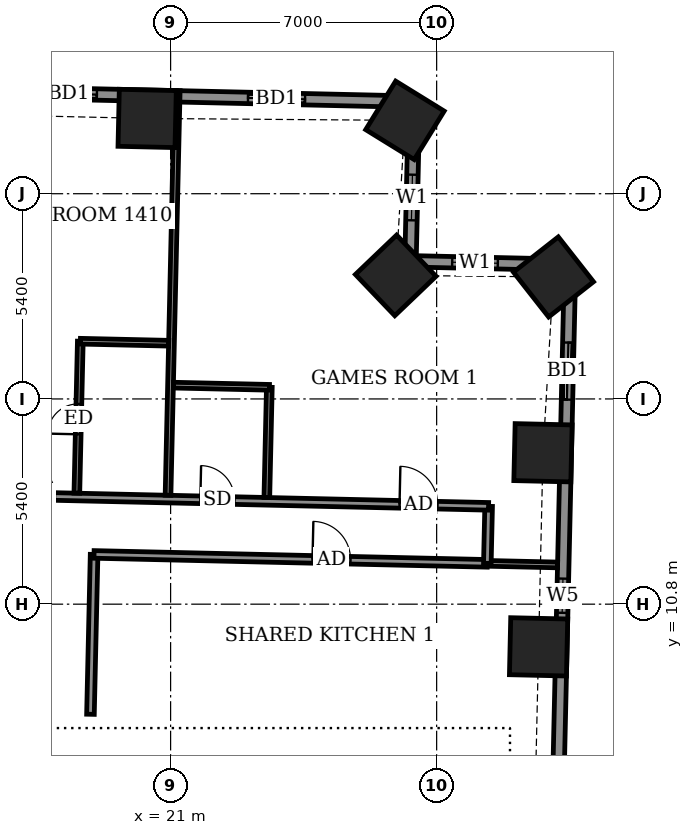
"""IFC4 building model, lengths in metres.
Left out: names, types, materials, properties, quantities, classifications, styles, units other than length and angle.
Written with IfcOpenShell. Run it as: python <this file> out.ifc"""

import sys

from ifc_helpers import new_model, si_unit, direction, frame, frame_2d, origin, origin_2d, place, context, subcontext, project, spatial, rectangle, extrude, element, fill, save


model = new_model("IFC4")
c1 = context("Model", 3, precision=1e-05, world=origin(), true_north=direction((0.0, 1.0)))
c2 = subcontext(c1, "Body", "Model", "MODEL_VIEW")
j1 = project(units=[si_unit("LENGTHUNIT", "METRE"), si_unit("PLANEANGLEUNIT", "RADIAN")], contexts=[c1])
p1 = place(None, origin())
s1 = spatial("IfcSite", under=j1, at=p1, CompositionType="ELEMENT")
p2 = place(p1, origin())
s2 = spatial("IfcBuilding", under=s1, at=p2, CompositionType="ELEMENT")
p3 = place(p2, frame((0.0, 0.0, 60.3)))
s3 = spatial("IfcBuildingStorey", under=s2, at=p3, CompositionType="ELEMENT", Elevation=60.3)
for number, where, z_axis, x_axis in (
    (1, (30.682, 9.677, -0.55), (0.0, 0.0, 1.0), (0.023, 1.0, 0.0)),
    (2, (30.798, 14.784, -0.55), (0.0, 0.0, 1.0), (0.023, 1.0, 0.0)),
    (3, (31.074, 19.41, -0.55), (0.0, 0.0, 1.0), (-0.617, 0.787, 0.0)),
    (4, (26.923, 19.451, -0.55), (0.0, 0.0, 1.0), (-0.691, 0.723, 0.0)),
    (5, (27.166, 23.53, -0.55), (0.0, 0.0, 1.0), (-0.851, 0.525, 0.0)),
    (6, (20.383, 23.58, -0.55), (0.0, 0.0, 1.0), (-1.0, 0.023, 0.0)),
):
    element("IfcColumn", number, at=place(p3, frame(where, z_axis=z_axis, x_axis=x_axis)), inside=s3, PredefinedType="COLUMN", context=c2, shape_type="SweptSolid", body=[
        extrude(rectangle(XDim=1.5, YDim=1.5, at=origin_2d()), origin(), (0.0, 0.0, 1.0), 3.6),
    ])
p4 = place(p3, frame((31.165, 4.502, 0.0), z_axis=(0.0, 0.0, 1.0), x_axis=(0.022716307128, 0.999741951401, 0.0)))
e7 = element("IfcWall", 7, at=p4, inside=s3, PredefinedType="SOLIDWALL", context=c2, shape_type="SweptSolid", body=[
    extrude(rectangle(XDim=15.229, YDim=0.3, at=frame_2d((7.615, 0.0))), origin(), (0.0, 0.0, 1.0), 3.05),
])
p5 = place(p4, frame((6.072, 0.0, 0.9)))
e8 = element("IfcOpeningElement", 8, at=p5, cuts=e7, PredefinedType="OPENING", context=c2, shape_type="SweptSolid", body=[
    extrude(rectangle(XDim=0.9, YDim=1.5, at=frame_2d((0.45, 0.75))), frame((0.0, 0.16, 0.0), z_axis=(0.0, -1.0, 0.0), x_axis=(1.0, 0.0, 0.0)), (0.0, 0.0, 1.0), 0.32),
])
p6 = place(p4, frame((11.684, 0.0, 0.0)))
e9 = element("IfcOpeningElement", 9, at=p6, cuts=e7, PredefinedType="OPENING", context=c2, shape_type="SweptSolid", body=[
    extrude(rectangle(XDim=1.5, YDim=2.4, at=frame_2d((0.75, 1.2))), frame((0.0, 0.16, 0.0), z_axis=(0.0, -1.0, 0.0), x_axis=(1.0, 0.0, 0.0)), (0.0, 0.0, 1.0), 0.32),
])
p7 = place(p3, frame((31.511, 19.727, 0.0), z_axis=(0.0, 0.0, 1.0), x_axis=(-0.999744320311, 0.022611811187, 0.0)))
e10 = element("IfcWall", 10, at=p7, inside=s3, PredefinedType="SOLIDWALL", context=c2, shape_type="SweptSolid", body=[
    extrude(rectangle(XDim=4.2, YDim=0.3, at=frame_2d((2.1, 0.0))), origin(), (0.0, 0.0, 1.0), 3.05),
])
p8 = place(p7, frame((1.902, 0.0, 0.9)))
e11 = element("IfcOpeningElement", 11, at=p8, cuts=e10, PredefinedType="OPENING", context=c2, shape_type="SweptSolid", body=[
    extrude(rectangle(XDim=1.2, YDim=1.5, at=frame_2d((0.6, 0.75))), frame((0.0, 0.16, 0.0), z_axis=(0.0, -1.0, 0.0), x_axis=(1.0, 0.0, 0.0)), (0.0, 0.0, 1.0), 0.32),
])
p9 = place(p3, frame((27.312, 19.822, 0.0), z_axis=(0.0, 0.0, 1.0), x_axis=(0.022611811187, 0.999744320311, 0.0)))
e12 = element("IfcWall", 12, at=p9, inside=s3, PredefinedType="SOLIDWALL", context=c2, shape_type="SweptSolid", body=[
    extrude(rectangle(XDim=4.2, YDim=0.3, at=frame_2d((2.1, 0.0))), origin(), (0.0, 0.0, 1.0), 2.55),
])
p10 = place(p9, frame((1.079, 0.0, 0.9)))
e13 = element("IfcOpeningElement", 13, at=p10, cuts=e12, PredefinedType="OPENING", context=c2, shape_type="SweptSolid", body=[
    extrude(rectangle(XDim=1.2, YDim=1.5, at=frame_2d((0.6, 0.75))), frame((0.0, 0.16, 0.0), z_axis=(0.0, -1.0, 0.0), x_axis=(1.0, 0.0, 0.0)), (0.0, 0.0, 1.0), 0.32),
])
p11 = place(p3, frame((27.407, 24.021, 0.0), z_axis=(0.0, 0.0, 1.0), x_axis=(-0.99974239923, 0.022696589664, 0.0)))
e14 = element("IfcWall", 14, at=p11, inside=s3, PredefinedType="SOLIDWALL", context=c2, shape_type="SweptSolid", body=[
    extrude(rectangle(XDim=49.836, YDim=0.3, at=frame_2d((24.918, 0.0))), origin(), (0.0, 0.0, 1.0), 3.05),
])
p12 = place(p11, frame((2.871, 0.0, 0.0)))
e15 = element("IfcOpeningElement", 15, at=p12, cuts=e14, PredefinedType="OPENING", context=c2, shape_type="SweptSolid", body=[
    extrude(rectangle(XDim=1.5, YDim=2.4, at=frame_2d((0.75, 1.2))), frame((0.0, 0.16, 0.0), z_axis=(0.0, -1.0, 0.0), x_axis=(1.0, 0.0, 0.0)), (0.0, 0.0, 1.0), 0.32),
])
p13 = place(p11, frame((8.349, 0.0, 0.0)))
e16 = element("IfcOpeningElement", 16, at=p13, cuts=e14, PredefinedType="OPENING", context=c2, shape_type="SweptSolid", body=[
    extrude(rectangle(XDim=1.5, YDim=2.4, at=frame_2d((0.75, 1.2))), frame((0.0, 0.16, 0.0), z_axis=(0.0, -1.0, 0.0), x_axis=(1.0, 0.0, 0.0)), (0.0, 0.0, 1.0), 0.32),
])
p14 = place(p11, frame((11.43, 0.0, 0.0)))
e17 = element("IfcOpeningElement", 17, at=p14, cuts=e14, PredefinedType="OPENING", context=c2, shape_type="SweptSolid", body=[
    extrude(rectangle(XDim=1.5, YDim=2.4, at=frame_2d((0.75, 1.2))), frame((0.0, 0.16, 0.0), z_axis=(0.0, -1.0, 0.0), x_axis=(1.0, 0.0, 0.0)), (0.0, 0.0, 1.0), 0.32),
])
p15 = place(p11, frame((17.236, 0.0, 0.0)))
e18 = element("IfcOpeningElement", 18, at=p15, cuts=e14, PredefinedType="OPENING", context=c2, shape_type="SweptSolid", body=[
    extrude(rectangle(XDim=1.5, YDim=2.4, at=frame_2d((0.75, 1.2))), frame((0.0, 0.16, 0.0), z_axis=(0.0, -1.0, 0.0), x_axis=(1.0, 0.0, 0.0)), (0.0, 0.0, 1.0), 0.32),
])
p16 = place(p11, frame((22.686, 0.0, 0.0)))
e19 = element("IfcOpeningElement", 19, at=p16, cuts=e14, PredefinedType="OPENING", context=c2, shape_type="SweptSolid", body=[
    extrude(rectangle(XDim=1.5, YDim=2.4, at=frame_2d((0.75, 1.2))), frame((0.0, 0.16, 0.0), z_axis=(0.0, -1.0, 0.0), x_axis=(1.0, 0.0, 0.0)), (0.0, 0.0, 1.0), 0.32),
])
p17 = place(p11, frame((25.767, 0.0, 0.0)))
e20 = element("IfcOpeningElement", 20, at=p17, cuts=e14, PredefinedType="OPENING", context=c2, shape_type="SweptSolid", body=[
    extrude(rectangle(XDim=1.5, YDim=2.4, at=frame_2d((0.75, 1.2))), frame((0.0, 0.16, 0.0), z_axis=(0.0, -1.0, 0.0), x_axis=(1.0, 0.0, 0.0)), (0.0, 0.0, 1.0), 0.32),
])
p18 = place(p11, frame((31.211, 0.0, 0.0)))
e21 = element("IfcOpeningElement", 21, at=p18, cuts=e14, PredefinedType="OPENING", context=c2, shape_type="SweptSolid", body=[
    extrude(rectangle(XDim=1.5, YDim=2.4, at=frame_2d((0.75, 1.2))), frame((0.0, 0.16, 0.0), z_axis=(0.0, -1.0, 0.0), x_axis=(1.0, 0.0, 0.0)), (0.0, 0.0, 1.0), 0.32),
])
p19 = place(p11, frame((36.974, 0.0, 0.0)))
e22 = element("IfcOpeningElement", 22, at=p19, cuts=e14, PredefinedType="OPENING", context=c2, shape_type="SweptSolid", body=[
    extrude(rectangle(XDim=1.5, YDim=2.4, at=frame_2d((0.75, 1.2))), frame((0.0, 0.16, 0.0), z_axis=(0.0, -1.0, 0.0), x_axis=(1.0, 0.0, 0.0)), (0.0, 0.0, 1.0), 0.32),
])
p20 = place(p11, frame((40.055, 0.0, 0.0)))
e23 = element("IfcOpeningElement", 23, at=p20, cuts=e14, PredefinedType="OPENING", context=c2, shape_type="SweptSolid", body=[
    extrude(rectangle(XDim=1.5, YDim=2.4, at=frame_2d((0.75, 1.2))), frame((0.0, 0.16, 0.0), z_axis=(0.0, -1.0, 0.0), x_axis=(1.0, 0.0, 0.0)), (0.0, 0.0, 1.0), 0.32),
])
p21 = place(p11, frame((45.282, 0.0, 0.9)))
e24 = element("IfcOpeningElement", 24, at=p21, cuts=e14, PredefinedType="OPENING", context=c2, shape_type="SweptSolid", body=[
    extrude(rectangle(XDim=2.4, YDim=1.5, at=frame_2d((1.2, 0.75))), frame((0.0, 0.16, 0.0), z_axis=(0.0, -1.0, 0.0), x_axis=(1.0, 0.0, 0.0)), (0.0, 0.0, 1.0), 0.32),
])
p22 = place(p3, frame((18.891, 7.903, 0.0), z_axis=(0.0, 0.0, 1.0), x_axis=(0.022807092041, 0.999739884446, 0.0)))
e25 = element("IfcWall", 25, at=p22, inside=s3, PredefinedType="PARTITIONING", context=c2, shape_type="SweptSolid", body=[
    extrude(rectangle(XDim=4.207, YDim=0.2, at=frame_2d((2.104, 0.0))), origin(), (0.0, 0.0, 1.0), 3.05),
])
p23 = place(p3, frame((18.985, 12.109, 0.0), z_axis=(0.0, 0.0, 1.0), x_axis=(0.999742480592, -0.022693005506, 0.0)))
e26 = element("IfcWall", 26, at=p23, inside=s3, PredefinedType="PARTITIONING", context=c2, shape_type="SweptSolid", body=[
    extrude(rectangle(XDim=10.35, YDim=0.2, at=frame_2d((5.175, 0.0))), origin(), (0.0, 0.0, 1.0), 3.05),
])
p24 = place(p23, frame((5.75, 0.0, 0.0)))
e27 = element("IfcOpeningElement", 27, at=p24, cuts=e26, PredefinedType="OPENING", context=c2, shape_type="SweptSolid", body=[
    extrude(rectangle(XDim=1.0, YDim=2.1, at=frame_2d((0.5, 1.05))), frame((0.0, 0.11, 0.0), z_axis=(0.0, -1.0, 0.0), x_axis=(1.0, 0.0, 0.0)), (0.0, 0.0, 1.0), 0.22),
])
p25 = place(p3, frame((29.332, 11.874, 0.0), z_axis=(0.0, 0.0, 1.0), x_axis=(0.999742448242, -0.022694430658, 0.0)))
e28 = element("IfcWall", 28, at=p25, inside=s3, PredefinedType="PARTITIONING", context=c2, shape_type="SweptSolid", body=[
    extrude(rectangle(XDim=1.85, YDim=0.15, at=frame_2d((0.925, 0.0))), origin(), (0.0, 0.0, 1.0), 2.55),
])
p26 = place(p3, frame((29.334, 11.874, 0.0), z_axis=(0.0, 0.0, 1.0), x_axis=(0.022617910375, 0.999744182344, 0.0)))
e29 = element("IfcWall", 29, at=p26, inside=s3, PredefinedType="PARTITIONING", context=c2, shape_type="SweptSolid", body=[
    extrude(rectangle(XDim=1.5, YDim=0.2, at=frame_2d((0.75, 0.0))), origin(), (0.0, 0.0, 1.0), 3.05),
])
p27 = place(p3, frame((-25.456, 14.618, 0.0), z_axis=(0.0, 0.0, 1.0), x_axis=(0.999742687583, -0.0226838847, 0.0)))
e30 = element("IfcWall", 30, at=p27, inside=s3, PredefinedType="PARTITIONING", context=c2, shape_type="SweptSolid", body=[
    extrude(rectangle(XDim=54.836, YDim=0.2, at=frame_2d((27.418, 0.0))), origin(), (0.0, 0.0, 1.0), 3.05),
])
p28 = place(p27, frame((52.493, 0.0, 0.0)))
e31 = element("IfcOpeningElement", 31, at=p28, cuts=e30, PredefinedType="OPENING", context=c2, shape_type="SweptSolid", body=[
    extrude(rectangle(XDim=1.0, YDim=2.1, at=frame_2d((0.5, 1.05))), frame((0.0, 0.11, 0.0), z_axis=(0.0, -1.0, 0.0), x_axis=(1.0, 0.0, 0.0)), (0.0, 0.0, 1.0), 0.22),
])
p29 = place(p27, frame((47.25, 0.0, 0.0)))
e32 = element("IfcOpeningElement", 32, at=p29, cuts=e30, PredefinedType="OPENING", context=c2, shape_type="SweptSolid", body=[
    extrude(rectangle(XDim=0.9, YDim=2.1, at=frame_2d((0.45, 1.05))), frame((0.0, 0.11, 0.0), z_axis=(0.0, -1.0, 0.0), x_axis=(1.0, 0.0, 0.0)), (0.0, 0.0, 1.0), 0.22),
])
p30 = place(p27, frame((42.525, 0.0, 0.0)))
e33 = element("IfcOpeningElement", 33, at=p30, cuts=e30, PredefinedType="OPENING", context=c2, shape_type="SweptSolid", body=[
    extrude(rectangle(XDim=0.9, YDim=2.1, at=frame_2d((0.45, 1.05))), frame((0.0, 0.11, 0.0), z_axis=(0.0, -1.0, 0.0), x_axis=(1.0, 0.0, 0.0)), (0.0, 0.0, 1.0), 0.22),
])
p31 = place(p27, frame((40.275, 0.0, 0.0)))
e34 = element("IfcOpeningElement", 34, at=p31, cuts=e30, PredefinedType="OPENING", context=c2, shape_type="SweptSolid", body=[
    extrude(rectangle(XDim=0.9, YDim=2.1, at=frame_2d((0.45, 1.05))), frame((0.0, 0.11, 0.0), z_axis=(0.0, -1.0, 0.0), x_axis=(1.0, 0.0, 0.0)), (0.0, 0.0, 1.0), 0.22),
])
p32 = place(p27, frame((33.0, 0.0, 0.0)))
e35 = element("IfcOpeningElement", 35, at=p32, cuts=e30, PredefinedType="OPENING", context=c2, shape_type="SweptSolid", body=[
    extrude(rectangle(XDim=0.9, YDim=2.1, at=frame_2d((0.45, 1.05))), frame((0.0, 0.11, 0.0), z_axis=(0.0, -1.0, 0.0), x_axis=(1.0, 0.0, 0.0)), (0.0, 0.0, 1.0), 0.22),
])
p33 = place(p27, frame((30.65, 0.0, 0.0)))
e36 = element("IfcOpeningElement", 36, at=p33, cuts=e30, PredefinedType="OPENING", context=c2, shape_type="SweptSolid", body=[
    extrude(rectangle(XDim=0.9, YDim=2.1, at=frame_2d((0.45, 1.05))), frame((0.0, 0.11, 0.0), z_axis=(0.0, -1.0, 0.0), x_axis=(1.0, 0.0, 0.0)), (0.0, 0.0, 1.0), 0.22),
])
p34 = place(p27, frame((23.7, 0.0, 0.0)))
e37 = element("IfcOpeningElement", 37, at=p34, cuts=e30, PredefinedType="OPENING", context=c2, shape_type="SweptSolid", body=[
    extrude(rectangle(XDim=0.9, YDim=2.1, at=frame_2d((0.45, 1.05))), frame((0.0, 0.11, 0.0), z_axis=(0.0, -1.0, 0.0), x_axis=(1.0, 0.0, 0.0)), (0.0, 0.0, 1.0), 0.22),
])
p35 = place(p27, frame((21.425, 0.0, 0.0)))
e38 = element("IfcOpeningElement", 38, at=p35, cuts=e30, PredefinedType="OPENING", context=c2, shape_type="SweptSolid", body=[
    extrude(rectangle(XDim=0.9, YDim=2.1, at=frame_2d((0.45, 1.05))), frame((0.0, 0.11, 0.0), z_axis=(0.0, -1.0, 0.0), x_axis=(1.0, 0.0, 0.0)), (0.0, 0.0, 1.0), 0.22),
])
p36 = place(p27, frame((14.15, 0.0, 0.0)))
e39 = element("IfcOpeningElement", 39, at=p36, cuts=e30, PredefinedType="OPENING", context=c2, shape_type="SweptSolid", body=[
    extrude(rectangle(XDim=0.9, YDim=2.1, at=frame_2d((0.45, 1.05))), frame((0.0, 0.11, 0.0), z_axis=(0.0, -1.0, 0.0), x_axis=(1.0, 0.0, 0.0)), (0.0, 0.0, 1.0), 0.22),
])
p37 = place(p27, frame((11.625, 0.0, 0.0)))
e40 = element("IfcOpeningElement", 40, at=p37, cuts=e30, PredefinedType="OPENING", context=c2, shape_type="SweptSolid", body=[
    extrude(rectangle(XDim=0.9, YDim=2.1, at=frame_2d((0.45, 1.05))), frame((0.0, 0.11, 0.0), z_axis=(0.0, -1.0, 0.0), x_axis=(1.0, 0.0, 0.0)), (0.0, 0.0, 1.0), 0.22),
])
p38 = place(p27, frame((1.425, 0.0, 0.0)))
e41 = element("IfcOpeningElement", 41, at=p38, cuts=e30, PredefinedType="OPENING", context=c2, shape_type="SweptSolid", body=[
    extrude(rectangle(XDim=1.0, YDim=2.1, at=frame_2d((0.5, 1.05))), frame((0.0, 0.11, 0.0), z_axis=(0.0, -1.0, 0.0), x_axis=(1.0, 0.0, 0.0)), (0.0, 0.0, 1.0), 0.22),
])
p39 = place(p27, frame((6.75, 0.0, 0.0)))
e42 = element("IfcOpeningElement", 42, at=p39, cuts=e30, PredefinedType="OPENING", context=c2, shape_type="SweptSolid", body=[
    extrude(rectangle(XDim=0.9, YDim=2.1, at=frame_2d((0.45, 1.05))), frame((0.0, 0.11, 0.0), z_axis=(0.0, -1.0, 0.0), x_axis=(1.0, 0.0, 0.0)), (0.0, 0.0, 1.0), 0.22),
])
p40 = place(p3, frame((18.533, 13.72, 0.0), z_axis=(0.0, 0.0, 1.0), x_axis=(0.022765770952, 0.999740826251, 0.0)))
e43 = element("IfcWall", 43, at=p40, inside=s3, PredefinedType="PARTITIONING", context=c2, shape_type="SweptSolid", body=[
    extrude(rectangle(XDim=4.0, YDim=0.15, at=frame_2d((2.0, 0.0))), origin(), (0.0, 0.0, 1.0), 3.05),
])
p41 = place(p40, frame((1.55, 0.0, 0.0)))
e44 = element("IfcOpeningElement", 44, at=p41, cuts=e43, PredefinedType="OPENING", context=c2, shape_type="SweptSolid", body=[
    extrude(rectangle(XDim=0.8, YDim=2.1, at=frame_2d((0.4, 1.05))), frame((0.0, 0.085, 0.0), z_axis=(0.0, -1.0, 0.0), x_axis=(1.0, 0.0, 0.0)), (0.0, 0.0, 1.0), 0.17),
])
p42 = place(p3, frame((20.932, 13.665, 0.0), z_axis=(0.0, 0.0, 1.0), x_axis=(0.022739109038, 0.999741433032, 0.0)))
e45 = element("IfcWall", 45, at=p42, inside=s3, PredefinedType="PARTITIONING", context=c2, shape_type="SweptSolid", body=[
    extrude(rectangle(XDim=10.651, YDim=0.15, at=frame_2d((5.325, 0.0))), origin(), (0.0, 0.0, 1.0), 2.55),
])
p43 = place(p3, frame((23.532, 13.606, 0.0), z_axis=(0.0, 0.0, 1.0), x_axis=(0.022723317103, 0.999741792094, 0.0)))
e46 = element("IfcWall", 46, at=p43, inside=s3, PredefinedType="PARTITIONING", context=c2, shape_type="SweptSolid", body=[
    extrude(rectangle(XDim=2.901, YDim=0.15, at=frame_2d((1.45, 0.0))), origin(), (0.0, 0.0, 1.0), 3.05),
])
p44 = place(p3, frame((21.075, 16.563, 0.0), z_axis=(0.0, 0.0, 1.0), x_axis=(0.999746356616, -0.022521599255, 0.0)))
e47 = element("IfcWall", 47, at=p44, inside=s3, PredefinedType="PARTITIONING", context=c2, shape_type="SweptSolid", body=[
    extrude(rectangle(XDim=2.526, YDim=0.15, at=frame_2d((1.263, 0.0))), origin(), (0.0, 0.0, 1.0), 3.05),
])
p45 = place(p3, frame((18.626, 17.719, 0.0), z_axis=(0.0, 0.0, 1.0), x_axis=(0.999740260747, -0.02279059109, 0.0)))
e48 = element("IfcWall", 48, at=p45, inside=s3, PredefinedType="PARTITIONING", context=c2, shape_type="SweptSolid", body=[
    extrude(rectangle(XDim=2.324, YDim=0.15, at=frame_2d((1.162, 0.0))), origin(), (0.0, 0.0, 1.0), 3.05),
])
p46 = place(p5, origin())
e49 = element("IfcWindow", 49, at=p46, inside=s3, PartitioningType="SINGLE_PANEL", PredefinedType="WINDOW", context=c2, shape_type="SweptSolid", body=[
    extrude(rectangle(XDim=0.9, YDim=1.5, at=frame_2d((0.45, 0.75))), frame((0.0, 0.03, 0.0), z_axis=(0.0, -1.0, 0.0), x_axis=(1.0, 0.0, 0.0)), (0.0, 0.0, 1.0), 0.06),
])
fill(e8, e49)
p47 = place(p6, origin())
e50 = element("IfcDoor", 50, at=p47, inside=s3, OperationType="SLIDING_TO_LEFT", PredefinedType="DOOR", context=c2, shape_type="SweptSolid", body=[
    extrude(rectangle(XDim=1.5, YDim=2.4, at=frame_2d((0.75, 1.2))), frame((0.0, 0.025, 0.0), z_axis=(0.0, -1.0, 0.0), x_axis=(1.0, 0.0, 0.0)), (0.0, 0.0, 1.0), 0.05),
])
fill(e9, e50)
p48 = place(p8, origin())
e51 = element("IfcWindow", 51, at=p48, inside=s3, PartitioningType="SINGLE_PANEL", PredefinedType="WINDOW", context=c2, shape_type="SweptSolid", body=[
    extrude(rectangle(XDim=1.2, YDim=1.5, at=frame_2d((0.6, 0.75))), frame((0.0, 0.03, 0.0), z_axis=(0.0, -1.0, 0.0), x_axis=(1.0, 0.0, 0.0)), (0.0, 0.0, 1.0), 0.06),
])
fill(e11, e51)
p49 = place(p10, origin())
e52 = element("IfcWindow", 52, at=p49, inside=s3, PartitioningType="SINGLE_PANEL", PredefinedType="WINDOW", context=c2, shape_type="SweptSolid", body=[
    extrude(rectangle(XDim=1.2, YDim=1.5, at=frame_2d((0.6, 0.75))), frame((0.0, 0.03, 0.0), z_axis=(0.0, -1.0, 0.0), x_axis=(1.0, 0.0, 0.0)), (0.0, 0.0, 1.0), 0.06),
])
fill(e13, e52)
p50 = place(p12, origin())
e53 = element("IfcDoor", 53, at=p50, inside=s3, OperationType="SLIDING_TO_LEFT", PredefinedType="DOOR", context=c2, shape_type="SweptSolid", body=[
    extrude(rectangle(XDim=1.5, YDim=2.4, at=frame_2d((0.75, 1.2))), frame((0.0, 0.025, 0.0), z_axis=(0.0, -1.0, 0.0), x_axis=(1.0, 0.0, 0.0)), (0.0, 0.0, 1.0), 0.05),
])
fill(e15, e53)
p51 = place(p13, origin())
e54 = element("IfcDoor", 54, at=p51, inside=s3, OperationType="SLIDING_TO_LEFT", PredefinedType="DOOR", context=c2, shape_type="SweptSolid", body=[
    extrude(rectangle(XDim=1.5, YDim=2.4, at=frame_2d((0.75, 1.2))), frame((0.0, 0.025, 0.0), z_axis=(0.0, -1.0, 0.0), x_axis=(1.0, 0.0, 0.0)), (0.0, 0.0, 1.0), 0.05),
])
fill(e16, e54)
p52 = place(p24, origin())
e55 = element("IfcDoor", 55, at=p52, inside=s3, OperationType="SINGLE_SWING_RIGHT", PredefinedType="DOOR", context=c2, shape_type="SweptSolid", body=[
    extrude(rectangle(XDim=1.0, YDim=2.1, at=frame_2d((0.5, 1.05))), frame((0.0, 0.025, 0.0), z_axis=(0.0, -1.0, 0.0), x_axis=(1.0, 0.0, 0.0)), (0.0, 0.0, 1.0), 0.05),
])
fill(e27, e55)
p53 = place(p28, origin())
e56 = element("IfcDoor", 56, at=p53, inside=s3, OperationType="SINGLE_SWING_LEFT", PredefinedType="DOOR", context=c2, shape_type="SweptSolid", body=[
    extrude(rectangle(XDim=1.0, YDim=2.1, at=frame_2d((0.5, 1.05))), frame((0.0, 0.025, 0.0), z_axis=(0.0, -1.0, 0.0), x_axis=(1.0, 0.0, 0.0)), (0.0, 0.0, 1.0), 0.05),
])
fill(e31, e56)
p54 = place(p29, origin())
e57 = element("IfcDoor", 57, at=p54, inside=s3, OperationType="SINGLE_SWING_LEFT", PredefinedType="DOOR", context=c2, shape_type="SweptSolid", body=[
    extrude(rectangle(XDim=0.9, YDim=2.1, at=frame_2d((0.45, 1.05))), frame((0.0, 0.025, 0.0), z_axis=(0.0, -1.0, 0.0), x_axis=(1.0, 0.0, 0.0)), (0.0, 0.0, 1.0), 0.05),
])
fill(e32, e57)
p55 = place(p30, origin())
e58 = element("IfcDoor", 58, at=p55, inside=s3, OperationType="SINGLE_SWING_RIGHT", PredefinedType="DOOR", context=c2, shape_type="SweptSolid", body=[
    extrude(rectangle(XDim=0.9, YDim=2.1, at=frame_2d((0.45, 1.05))), frame((0.0, 0.025, 0.0), z_axis=(0.0, -1.0, 0.0), x_axis=(1.0, 0.0, 0.0)), (0.0, 0.0, 1.0), 0.05),
])
fill(e33, e58)
p56 = place(p41, origin())
e59 = element("IfcDoor", 59, at=p56, inside=s3, OperationType="SINGLE_SWING_RIGHT", PredefinedType="DOOR", context=c2, shape_type="SweptSolid", body=[
    extrude(rectangle(XDim=0.8, YDim=2.1, at=frame_2d((0.4, 1.05))), frame((0.0, 0.025, 0.0), z_axis=(0.0, -1.0, 0.0), x_axis=(1.0, 0.0, 0.0)), (0.0, 0.0, 1.0), 0.05),
])
fill(e44, e59)
save(model, sys.argv[1])
